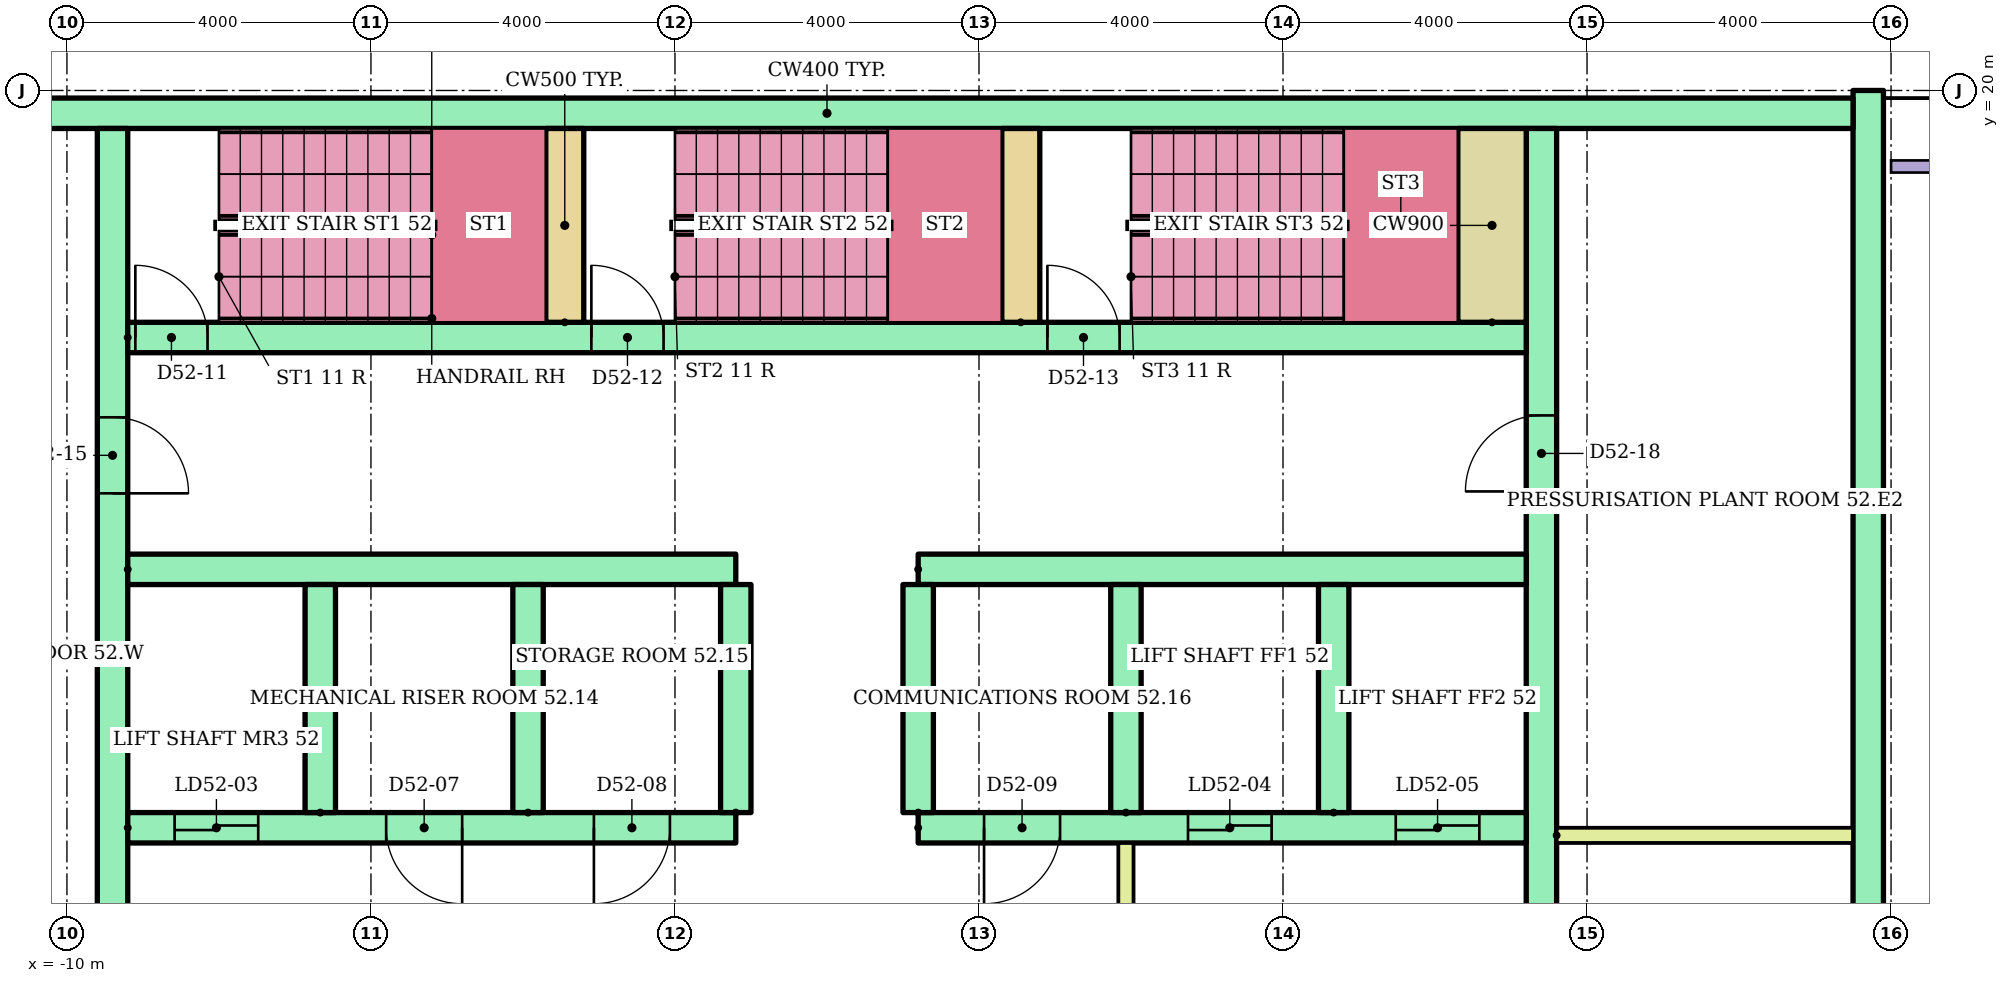
"""IFC4 building model, lengths in metres.
Left out: names, types, materials, properties, quantities, classifications, styles, units other than length and angle.
Written with IfcOpenShell. Run it as: python <this file> out.ifc"""

import sys

from ifc_helpers import new_model, si_unit, direction, frame, frame_2d, origin, place, context, subcontext, project, spatial, rectangle, extrude, element, fill, save


model = new_model("IFC4")
c1 = context("Model", 3, precision=1e-05, world=origin(), true_north=direction((0.0, 1.0)))
c2 = subcontext(c1, "Body", "Model", "MODEL_VIEW")
j1 = project(units=[si_unit("LENGTHUNIT", "METRE"), si_unit("PLANEANGLEUNIT", "RADIAN")], contexts=[c1])
p1 = place(None, origin())
s1 = spatial("IfcSite", under=j1, at=p1, CompositionType="ELEMENT")
p2 = place(p1, origin())
s2 = spatial("IfcBuilding", under=s1, at=p2, CompositionType="ELEMENT")
p3 = place(p2, frame((0.0, 0.0, 203.7)))
s3 = spatial("IfcBuildingStorey", under=s2, at=p3, CompositionType="ELEMENT", Elevation=203.7)
p4 = place(p3, frame((13.7, 3.0, 0.0), z_axis=(0.0, 0.0, 1.0), x_axis=(0.0, 1.0, 0.0)))
e1 = element("IfcWall", 1, at=p4, inside=s3, PredefinedType="SHEAR", context=c2, shape_type="SweptSolid", body=[
    extrude(rectangle(XDim=17.0, YDim=0.4, at=frame_2d((8.5, 0.0))), origin(), (0.0, 0.0, 1.0), 3.62),
])
p5 = place(p3, frame((-13.5, 19.7, 0.0)))
e2 = element("IfcWall", 2, at=p5, inside=s3, PredefinedType="SHEAR", context=c2, shape_type="SweptSolid", body=[
    extrude(rectangle(XDim=27.0, YDim=0.4, at=frame_2d((13.5, 0.0))), origin(), (0.0, 0.0, 1.0), 3.62),
])
p6 = place(p3, frame((-9.4, 6.8, 0.0), z_axis=(0.0, 0.0, 1.0), x_axis=(0.0, 1.0, 0.0)))
e3 = element("IfcWall", 3, at=p6, inside=s3, PredefinedType="SHEAR", context=c2, shape_type="SweptSolid", body=[
    extrude(rectangle(XDim=12.7, YDim=0.4, at=frame_2d((6.35, 0.0))), origin(), (0.0, 0.0, 1.0), 3.62),
])
p7 = place(p6, frame((1.15, 0.0, 0.0)))
e4 = element("IfcOpeningElement", 4, at=p7, cuts=e3, PredefinedType="OPENING", context=c2, shape_type="SweptSolid", body=[
    extrude(rectangle(XDim=1.0, YDim=2.1, at=frame_2d((0.5, 1.05))), frame((0.0, 0.21, 0.0), z_axis=(0.0, -1.0, 0.0), x_axis=(1.0, 0.0, 0.0)), (0.0, 0.0, 1.0), 0.42),
])
p8 = place(p6, frame((7.9, 0.0, 0.0)))
e5 = element("IfcOpeningElement", 5, at=p8, cuts=e3, PredefinedType="OPENING", context=c2, shape_type="SweptSolid", body=[
    extrude(rectangle(XDim=1.0, YDim=2.1, at=frame_2d((0.5, 1.05))), frame((0.0, 0.21, 0.0), z_axis=(0.0, -1.0, 0.0), x_axis=(1.0, 0.0, 0.0)), (0.0, 0.0, 1.0), 0.42),
])
p9 = place(p3, frame((9.4, 6.8, 0.0), z_axis=(0.0, 0.0, 1.0), x_axis=(0.0, 1.0, 0.0)))
e6 = element("IfcWall", 6, at=p9, inside=s3, PredefinedType="SHEAR", context=c2, shape_type="SweptSolid", body=[
    extrude(rectangle(XDim=12.7, YDim=0.4, at=frame_2d((6.35, 0.0))), origin(), (0.0, 0.0, 1.0), 3.62),
])
p10 = place(p9, frame((1.15, 0.0, 0.0)))
e7 = element("IfcOpeningElement", 7, at=p10, cuts=e6, PredefinedType="OPENING", context=c2, shape_type="SweptSolid", body=[
    extrude(rectangle(XDim=1.0, YDim=2.1, at=frame_2d((0.5, 1.05))), frame((0.0, 0.21, 0.0), z_axis=(0.0, -1.0, 0.0), x_axis=(1.0, 0.0, 0.0)), (0.0, 0.0, 1.0), 0.42),
])
p11 = place(p9, frame((7.925, 0.0, 0.0)))
e8 = element("IfcOpeningElement", 8, at=p11, cuts=e6, PredefinedType="OPENING", context=c2, shape_type="SweptSolid", body=[
    extrude(rectangle(XDim=1.0, YDim=2.1, at=frame_2d((0.5, 1.05))), frame((0.0, 0.21, 0.0), z_axis=(0.0, -1.0, 0.0), x_axis=(1.0, 0.0, 0.0)), (0.0, 0.0, 1.0), 0.42),
])
p12 = place(p3, frame((-9.2, 10.3, 0.0)))
e9 = element("IfcWall", 9, at=p12, inside=s3, PredefinedType="SHEAR", context=c2, shape_type="SweptSolid", body=[
    extrude(rectangle(XDim=8.0, YDim=0.4, at=frame_2d((4.0, 0.0))), origin(), (0.0, 0.0, 1.0), 3.62),
])
p13 = place(p12, frame((0.617, 0.0, 0.0)))
e10 = element("IfcOpeningElement", 10, at=p13, cuts=e9, PredefinedType="OPENING", context=c2, shape_type="SweptSolid", body=[
    extrude(rectangle(XDim=1.1, YDim=2.1, at=frame_2d((0.55, 1.05))), frame((0.0, 0.21, 0.0), z_axis=(0.0, -1.0, 0.0), x_axis=(1.0, 0.0, 0.0)), (0.0, 0.0, 1.0), 0.42),
])
p14 = place(p12, frame((3.4, 0.0, 0.0)))
e11 = element("IfcOpeningElement", 11, at=p14, cuts=e9, PredefinedType="OPENING", context=c2, shape_type="SweptSolid", body=[
    extrude(rectangle(XDim=1.0, YDim=2.1, at=frame_2d((0.5, 1.05))), frame((0.0, 0.21, 0.0), z_axis=(0.0, -1.0, 0.0), x_axis=(1.0, 0.0, 0.0)), (0.0, 0.0, 1.0), 0.42),
])
p15 = place(p12, frame((6.133, 0.0, 0.0)))
e12 = element("IfcOpeningElement", 12, at=p15, cuts=e9, PredefinedType="OPENING", context=c2, shape_type="SweptSolid", body=[
    extrude(rectangle(XDim=1.0, YDim=2.1, at=frame_2d((0.5, 1.05))), frame((0.0, 0.21, 0.0), z_axis=(0.0, -1.0, 0.0), x_axis=(1.0, 0.0, 0.0)), (0.0, 0.0, 1.0), 0.42),
])
p16 = place(p3, frame((-9.2, 13.7, 0.0)))
e13 = element("IfcWall", 13, at=p16, inside=s3, PredefinedType="SHEAR", context=c2, shape_type="SweptSolid", body=[
    extrude(rectangle(XDim=8.0, YDim=0.4, at=frame_2d((4.0, 0.0))), origin(), (0.0, 0.0, 1.0), 3.62),
])
p17 = place(p3, frame((1.2, 10.3, 0.0)))
e14 = element("IfcWall", 14, at=p17, inside=s3, PredefinedType="SHEAR", context=c2, shape_type="SweptSolid", body=[
    extrude(rectangle(XDim=8.0, YDim=0.4, at=frame_2d((4.0, 0.0))), origin(), (0.0, 0.0, 1.0), 3.62),
])
p18 = place(p17, frame((3.55, 0.0, 0.0)))
e15 = element("IfcOpeningElement", 15, at=p18, cuts=e14, PredefinedType="OPENING", context=c2, shape_type="SweptSolid", body=[
    extrude(rectangle(XDim=1.1, YDim=2.1, at=frame_2d((0.55, 1.05))), frame((0.0, 0.21, 0.0), z_axis=(0.0, -1.0, 0.0), x_axis=(1.0, 0.0, 0.0)), (0.0, 0.0, 1.0), 0.42),
])
p19 = place(p17, frame((6.283, 0.0, 0.0)))
e16 = element("IfcOpeningElement", 16, at=p19, cuts=e14, PredefinedType="OPENING", context=c2, shape_type="SweptSolid", body=[
    extrude(rectangle(XDim=1.1, YDim=2.1, at=frame_2d((0.55, 1.05))), frame((0.0, 0.21, 0.0), z_axis=(0.0, -1.0, 0.0), x_axis=(1.0, 0.0, 0.0)), (0.0, 0.0, 1.0), 0.42),
])
p20 = place(p17, frame((0.867, 0.0, 0.0)))
e17 = element("IfcOpeningElement", 17, at=p20, cuts=e14, PredefinedType="OPENING", context=c2, shape_type="SweptSolid", body=[
    extrude(rectangle(XDim=1.0, YDim=2.1, at=frame_2d((0.5, 1.05))), frame((0.0, 0.21, 0.0), z_axis=(0.0, -1.0, 0.0), x_axis=(1.0, 0.0, 0.0)), (0.0, 0.0, 1.0), 0.42),
])
p21 = place(p3, frame((1.2, 13.7, 0.0)))
e18 = element("IfcWall", 18, at=p21, inside=s3, PredefinedType="SHEAR", context=c2, shape_type="SweptSolid", body=[
    extrude(rectangle(XDim=8.0, YDim=0.4, at=frame_2d((4.0, 0.0))), origin(), (0.0, 0.0, 1.0), 3.62),
])
for number, where, z_axis, x_axis in (
    (19, (-6.667, 10.5, 0.0), (0.0, 0.0, 1.0), (0.0, 1.0, 0.0)),
    (20, (-3.933, 10.5, 0.0), (0.0, 0.0, 1.0), (0.0, 1.0, 0.0)),
    (21, (-1.2, 10.5, 0.0), (0.0, 0.0, 1.0), (0.0, 1.0, 0.0)),
    (22, (1.2, 10.5, 0.0), (0.0, 0.0, 1.0), (0.0, 1.0, 0.0)),
    (23, (3.933, 10.5, 0.0), (0.0, 0.0, 1.0), (0.0, 1.0, 0.0)),
    (24, (6.667, 10.5, 0.0), (0.0, 0.0, 1.0), (0.0, 1.0, 0.0)),
):
    element("IfcWall", number, at=place(p3, frame(where, z_axis=z_axis, x_axis=x_axis)), inside=s3, PredefinedType="SHEAR", context=c2, shape_type="SweptSolid", body=[
        extrude(rectangle(XDim=3.0, YDim=0.4, at=frame_2d((1.5, 0.0))), origin(), (0.0, 0.0, 1.0), 3.62),
    ])
p22 = place(p3, frame((3.933, 6.8, 0.0), z_axis=(0.0, 0.0, 1.0), x_axis=(0.0, 1.0, 0.0)))
e25 = element("IfcWall", 25, at=p22, inside=s3, PredefinedType="PARTITIONING", context=c2, shape_type="SweptSolid", body=[
    extrude(rectangle(XDim=3.3, YDim=0.2, at=frame_2d((1.65, 0.0))), origin(), (0.0, 0.0, 1.0), 3.62),
])
p23 = place(p22, frame((1.1, 0.0, 0.0)))
e26 = element("IfcOpeningElement", 26, at=p23, cuts=e25, PredefinedType="OPENING", context=c2, shape_type="SweptSolid", body=[
    extrude(rectangle(XDim=1.1, YDim=2.1, at=frame_2d((0.55, 1.05))), frame((0.0, 0.11, 0.0), z_axis=(0.0, -1.0, 0.0), x_axis=(1.0, 0.0, 0.0)), (0.0, 0.0, 1.0), 0.22),
])
p24 = place(p3, frame((-9.2, 16.75, 0.0)))
e27 = element("IfcWall", 27, at=p24, inside=s3, PredefinedType="SHEAR", context=c2, shape_type="SweptSolid", body=[
    extrude(rectangle(XDim=18.4, YDim=0.4, at=frame_2d((9.2, 0.0))), origin(), (0.0, 0.0, 1.0), 3.62),
])
p25 = place(p24, frame((0.1, 0.0, 0.0)))
e28 = element("IfcOpeningElement", 28, at=p25, cuts=e27, PredefinedType="OPENING", context=c2, shape_type="SweptSolid", body=[
    extrude(rectangle(XDim=0.95, YDim=2.1, at=frame_2d((0.475, 1.05))), frame((0.0, 0.21, 0.0), z_axis=(0.0, -1.0, 0.0), x_axis=(1.0, 0.0, 0.0)), (0.0, 0.0, 1.0), 0.42),
])
p26 = place(p24, frame((6.1, 0.0, 0.0)))
e29 = element("IfcOpeningElement", 29, at=p26, cuts=e27, PredefinedType="OPENING", context=c2, shape_type="SweptSolid", body=[
    extrude(rectangle(XDim=0.95, YDim=2.1, at=frame_2d((0.475, 1.05))), frame((0.0, 0.21, 0.0), z_axis=(0.0, -1.0, 0.0), x_axis=(1.0, 0.0, 0.0)), (0.0, 0.0, 1.0), 0.42),
])
p27 = place(p24, frame((12.1, 0.0, 0.0)))
e30 = element("IfcOpeningElement", 30, at=p27, cuts=e27, PredefinedType="OPENING", context=c2, shape_type="SweptSolid", body=[
    extrude(rectangle(XDim=0.95, YDim=2.1, at=frame_2d((0.475, 1.05))), frame((0.0, 0.21, 0.0), z_axis=(0.0, -1.0, 0.0), x_axis=(1.0, 0.0, 0.0)), (0.0, 0.0, 1.0), 0.42),
])
for number, where, z_axis, x_axis in (
    (31, (-3.45, 16.95, 0.0), (0.0, 0.0, 1.0), (0.0, 1.0, 0.0)),
    (32, (2.55, 16.95, 0.0), (0.0, 0.0, 1.0), (0.0, 1.0, 0.0)),
):
    element("IfcWall", number, at=place(p3, frame(where, z_axis=z_axis, x_axis=x_axis)), inside=s3, PredefinedType="SHEAR", context=c2, shape_type="SweptSolid", body=[
        extrude(rectangle(XDim=2.55, YDim=0.5, at=frame_2d((1.275, 0.0))), origin(), (0.0, 0.0, 1.0), 3.62),
    ])
p28 = place(p3, frame((8.75, 16.95, 0.0), z_axis=(0.0, 0.0, 1.0), x_axis=(0.0, 1.0, 0.0)))
e33 = element("IfcWall", 33, at=p28, inside=s3, PredefinedType="SHEAR", context=c2, shape_type="SweptSolid", body=[
    extrude(rectangle(XDim=2.55, YDim=0.9, at=frame_2d((1.275, 0.0))), origin(), (0.0, 0.0, 1.0), 3.62),
])
p29 = place(p3, frame((9.6, 10.2, 0.0)))
e34 = element("IfcWall", 34, at=p29, inside=s3, PredefinedType="PARTITIONING", context=c2, shape_type="SweptSolid", body=[
    extrude(rectangle(XDim=3.9, YDim=0.2, at=frame_2d((1.95, 0.0))), origin(), (0.0, 0.0, 1.0), 3.62),
])
p30 = place(p13, origin())
e35 = element("IfcDoor", 35, at=p30, inside=s3, OperationType="SLIDING_TO_LEFT", PredefinedType="DOOR", context=c2, shape_type="SweptSolid", body=[
    extrude(rectangle(XDim=1.1, YDim=2.1, at=frame_2d((0.55, 1.05))), frame((0.0, 0.025, 0.0), z_axis=(0.0, -1.0, 0.0), x_axis=(1.0, 0.0, 0.0)), (0.0, 0.0, 1.0), 0.05),
])
fill(e10, e35)
p31 = place(p18, origin())
e36 = element("IfcDoor", 36, at=p31, inside=s3, OperationType="SLIDING_TO_LEFT", PredefinedType="DOOR", context=c2, shape_type="SweptSolid", body=[
    extrude(rectangle(XDim=1.1, YDim=2.1, at=frame_2d((0.55, 1.05))), frame((0.0, 0.025, 0.0), z_axis=(0.0, -1.0, 0.0), x_axis=(1.0, 0.0, 0.0)), (0.0, 0.0, 1.0), 0.05),
])
fill(e15, e36)
p32 = place(p19, origin())
e37 = element("IfcDoor", 37, at=p32, inside=s3, OperationType="SLIDING_TO_LEFT", PredefinedType="DOOR", context=c2, shape_type="SweptSolid", body=[
    extrude(rectangle(XDim=1.1, YDim=2.1, at=frame_2d((0.55, 1.05))), frame((0.0, 0.025, 0.0), z_axis=(0.0, -1.0, 0.0), x_axis=(1.0, 0.0, 0.0)), (0.0, 0.0, 1.0), 0.05),
])
fill(e16, e37)
p33 = place(p14, frame((1.0, 0.0, 0.0), z_axis=(0.0, 0.0, 1.0), x_axis=(-1.0, 0.0, 0.0)))
e38 = element("IfcDoor", 38, at=p33, inside=s3, OperationType="SINGLE_SWING_RIGHT", PredefinedType="DOOR", context=c2, shape_type="SweptSolid", body=[
    extrude(rectangle(XDim=1.0, YDim=2.1, at=frame_2d((0.5, 1.05))), frame((0.0, 0.025, 0.0), z_axis=(0.0, -1.0, 0.0), x_axis=(1.0, 0.0, 0.0)), (0.0, 0.0, 1.0), 0.05),
])
fill(e11, e38)
p34 = place(p15, frame((1.0, 0.0, 0.0), z_axis=(0.0, 0.0, 1.0), x_axis=(-1.0, 0.0, 0.0)))
e39 = element("IfcDoor", 39, at=p34, inside=s3, OperationType="SINGLE_SWING_LEFT", PredefinedType="DOOR", context=c2, shape_type="SweptSolid", body=[
    extrude(rectangle(XDim=1.0, YDim=2.1, at=frame_2d((0.5, 1.05))), frame((0.0, 0.025, 0.0), z_axis=(0.0, -1.0, 0.0), x_axis=(1.0, 0.0, 0.0)), (0.0, 0.0, 1.0), 0.05),
])
fill(e12, e39)
p35 = place(p20, frame((1.0, 0.0, 0.0), z_axis=(0.0, 0.0, 1.0), x_axis=(-1.0, 0.0, 0.0)))
e40 = element("IfcDoor", 40, at=p35, inside=s3, OperationType="SINGLE_SWING_LEFT", PredefinedType="DOOR", context=c2, shape_type="SweptSolid", body=[
    extrude(rectangle(XDim=1.0, YDim=2.1, at=frame_2d((0.5, 1.05))), frame((0.0, 0.025, 0.0), z_axis=(0.0, -1.0, 0.0), x_axis=(1.0, 0.0, 0.0)), (0.0, 0.0, 1.0), 0.05),
])
fill(e17, e40)
p36 = place(p25, origin())
e41 = element("IfcDoor", 41, at=p36, inside=s3, OperationType="SINGLE_SWING_LEFT", PredefinedType="DOOR", context=c2, shape_type="SweptSolid", body=[
    extrude(rectangle(XDim=0.95, YDim=2.1, at=frame_2d((0.475, 1.05))), frame((0.0, 0.025, 0.0), z_axis=(0.0, -1.0, 0.0), x_axis=(1.0, 0.0, 0.0)), (0.0, 0.0, 1.0), 0.05),
])
fill(e28, e41)
p37 = place(p26, origin())
e42 = element("IfcDoor", 42, at=p37, inside=s3, OperationType="SINGLE_SWING_LEFT", PredefinedType="DOOR", context=c2, shape_type="SweptSolid", body=[
    extrude(rectangle(XDim=0.95, YDim=2.1, at=frame_2d((0.475, 1.05))), frame((0.0, 0.025, 0.0), z_axis=(0.0, -1.0, 0.0), x_axis=(1.0, 0.0, 0.0)), (0.0, 0.0, 1.0), 0.05),
])
fill(e29, e42)
p38 = place(p27, origin())
e43 = element("IfcDoor", 43, at=p38, inside=s3, OperationType="SINGLE_SWING_LEFT", PredefinedType="DOOR", context=c2, shape_type="SweptSolid", body=[
    extrude(rectangle(XDim=0.95, YDim=2.1, at=frame_2d((0.475, 1.05))), frame((0.0, 0.025, 0.0), z_axis=(0.0, -1.0, 0.0), x_axis=(1.0, 0.0, 0.0)), (0.0, 0.0, 1.0), 0.05),
])
fill(e30, e43)
p39 = place(p8, frame((1.0, 0.0, 0.0), z_axis=(0.0, 0.0, 1.0), x_axis=(-1.0, 0.0, 0.0)))
e44 = element("IfcDoor", 44, at=p39, inside=s3, OperationType="SINGLE_SWING_LEFT", PredefinedType="DOOR", context=c2, shape_type="SweptSolid", body=[
    extrude(rectangle(XDim=1.0, YDim=2.1, at=frame_2d((0.5, 1.05))), frame((0.0, 0.025, 0.0), z_axis=(0.0, -1.0, 0.0), x_axis=(1.0, 0.0, 0.0)), (0.0, 0.0, 1.0), 0.05),
])
fill(e5, e44)
p40 = place(p11, origin())
e45 = element("IfcDoor", 45, at=p40, inside=s3, OperationType="SINGLE_SWING_LEFT", PredefinedType="DOOR", context=c2, shape_type="SweptSolid", body=[
    extrude(rectangle(XDim=1.0, YDim=2.1, at=frame_2d((0.5, 1.05))), frame((0.0, 0.025, 0.0), z_axis=(0.0, -1.0, 0.0), x_axis=(1.0, 0.0, 0.0)), (0.0, 0.0, 1.0), 0.05),
])
fill(e8, e45)
save(model, sys.argv[1])
